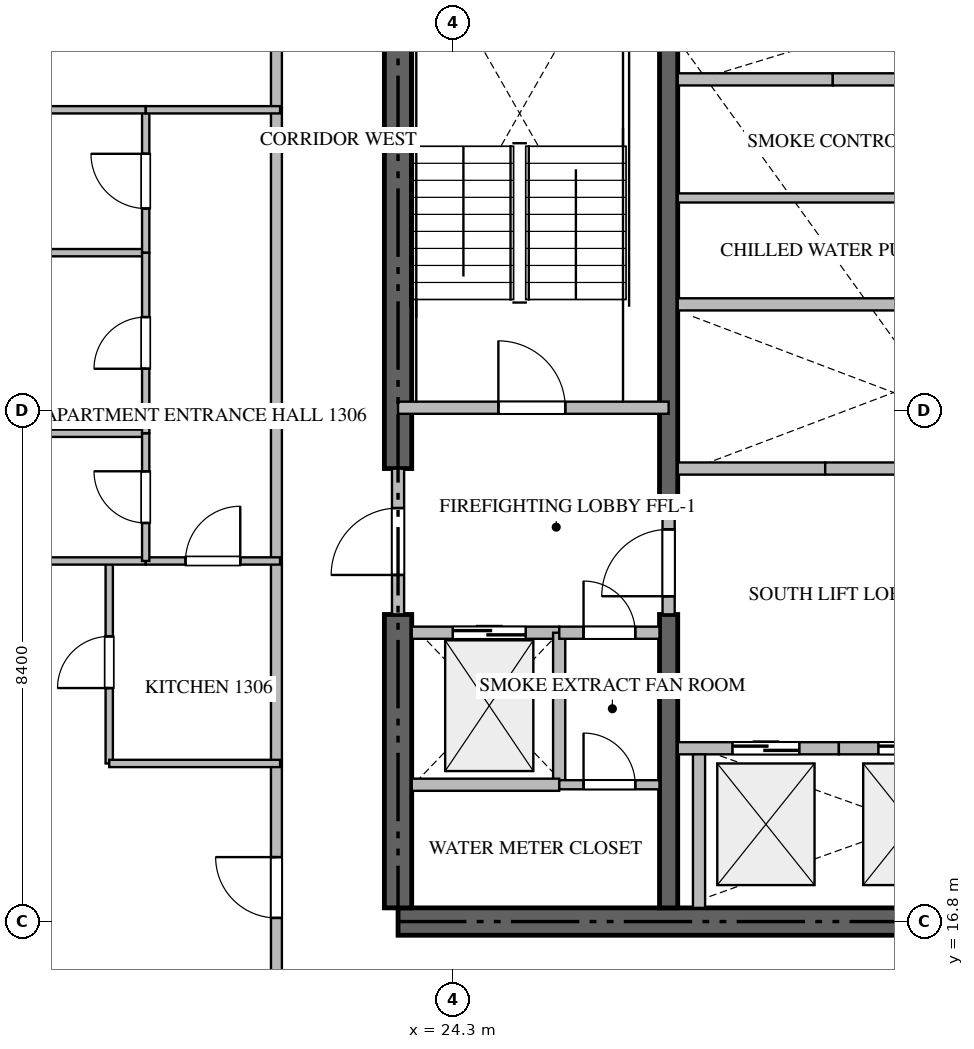
"""IFC4 building model, lengths in metres.
Left out: names, types, materials, properties, quantities, classifications, styles, units other than length and angle.
Written with IfcOpenShell. Run it as: python <this file> out.ifc"""

import sys

from ifc_helpers import new_model, si_unit, direction, frame, frame_2d, origin, place, context, subcontext, project, spatial, rectangle, extrude, source, transform, mapped, element, fill, save


model = new_model("IFC4")
c1 = context("Model", 3, precision=1e-05, world=origin(), true_north=direction((0.0, 1.0)))
c2 = subcontext(c1, "Body", "Model", "MODEL_VIEW")
j1 = project(units=[si_unit("LENGTHUNIT", "METRE"), si_unit("PLANEANGLEUNIT", "RADIAN")], contexts=[c1])
p1 = place(None, origin())
s1 = spatial("IfcSite", under=j1, at=p1, CompositionType="ELEMENT")
p2 = place(p1, origin())
s2 = spatial("IfcBuilding", under=s1, at=p2, CompositionType="ELEMENT")
p3 = place(p2, frame((0.0, 0.0, 56.7)))
s3 = spatial("IfcBuildingStorey", under=s2, at=p3, CompositionType="ELEMENT", Elevation=56.7)
p4 = place(p3, frame((23.4, 16.8, -0.26), z_axis=(0.0, 0.0, 1.0), x_axis=(1.0, 0.0, 0.0)))
e1 = element("IfcWall", 1, at=p4, inside=s3, PredefinedType="SHEAR", context=c2, shape_type="SweptSolid", body=[
    extrude(rectangle(XDim=18.0, YDim=0.45, at=frame_2d((9.0, 0.0))), origin(), (0.0, 0.0, 1.0), 3.748),
])
p5 = place(p3, frame((23.4, 17.025, -0.26), z_axis=(0.0, 0.0, 1.0), x_axis=(0.0, 1.0, 0.0)))
e2 = element("IfcWall", 2, at=p5, inside=s3, PredefinedType="SHEAR", context=c2, shape_type="SweptSolid", body=[
    extrude(rectangle(XDim=4.825, YDim=0.45, at=frame_2d((2.413, 0.0))), origin(), (0.0, 0.0, 1.0), 3.748),
])
p6 = place(p3, frame((23.4, 24.25, -0.26), z_axis=(0.0, 0.0, 1.0), x_axis=(0.0, 1.0, 0.0)))
e3 = element("IfcWall", 3, at=p6, inside=s3, PredefinedType="SHEAR", context=c2, shape_type="SweptSolid", body=[
    extrude(rectangle(XDim=9.125, YDim=0.45, at=frame_2d((4.562, 0.0))), origin(), (0.0, 0.0, 1.0), 3.748),
])
p7 = place(p3, frame((27.85, 17.025, -0.26), z_axis=(0.0, 0.0, 1.0), x_axis=(0.0, 1.0, 0.0)))
e4 = element("IfcWall", 4, at=p7, inside=s3, PredefinedType="SHEAR", context=c2, shape_type="SweptSolid", body=[
    extrude(rectangle(XDim=4.825, YDim=0.3, at=frame_2d((2.413, 0.0))), origin(), (0.0, 0.0, 1.0), 3.748),
])
p8 = place(p3, frame((27.85, 23.55, -0.26), z_axis=(0.0, 0.0, 1.0), x_axis=(0.0, 1.0, 0.0)))
e5 = element("IfcWall", 5, at=p8, inside=s3, PredefinedType="SHEAR", context=c2, shape_type="SweptSolid", body=[
    extrude(rectangle(XDim=9.825, YDim=0.3, at=frame_2d((4.913, 0.0))), origin(), (0.0, 0.0, 1.0), 3.748),
])
p9 = place(p3, frame((23.4, 25.25, 0.0), z_axis=(0.0, 0.0, 1.0), x_axis=(1.0, 0.0, 0.0)))
e6 = element("IfcWall", 6, at=p9, inside=s3, PredefinedType="STANDARD", context=c2, shape_type="SweptSolid", body=[
    extrude(rectangle(XDim=4.45, YDim=0.2, at=frame_2d((2.225, 0.0))), origin(), (0.0, 0.0, 1.0), 3.49),
])
p10 = place(p9, frame((1.65, 0.0, 0.0)))
e7 = element("IfcOpeningElement", 7, at=p10, cuts=e6, PredefinedType="OPENING", context=c2, shape_type="SweptSolid", body=[
    extrude(rectangle(XDim=1.1, YDim=2.15, at=frame_2d((0.55, 1.075))), frame((0.0, 0.11, 0.0), z_axis=(0.0, -1.0, 0.0), x_axis=(1.0, 0.0, 0.0)), (0.0, 0.0, 1.0), 0.22),
])
p11 = place(p3, frame((23.625, 21.55, 0.0), z_axis=(0.0, 0.0, 1.0), x_axis=(1.0, 0.0, 0.0)))
e8 = element("IfcWall", 8, at=p11, inside=s3, PredefinedType="STANDARD", context=c2, shape_type="SweptSolid", body=[
    extrude(rectangle(XDim=2.425, YDim=0.2, at=frame_2d((1.212, 0.0))), origin(), (0.0, 0.0, 1.0), 3.49),
])
p12 = place(p11, frame((0.675, 0.0, 0.0)))
e9 = element("IfcOpeningElement", 9, at=p12, cuts=e8, PredefinedType="OPENING", context=c2, shape_type="SweptSolid", body=[
    extrude(rectangle(XDim=1.2, YDim=2.2, at=frame_2d((0.6, 1.1))), frame((0.0, 0.11, 0.0), z_axis=(0.0, -1.0, 0.0), x_axis=(1.0, 0.0, 0.0)), (0.0, 0.0, 1.0), 0.22),
])
p13 = place(p3, frame((28.0, 19.65, 0.0), z_axis=(0.0, 0.0, 1.0), x_axis=(1.0, 0.0, 0.0)))
e10 = element("IfcWall", 10, at=p13, inside=s3, PredefinedType="STANDARD", context=c2, shape_type="SweptSolid", body=[
    extrude(rectangle(XDim=2.65, YDim=0.2, at=frame_2d((1.325, 0.0))), origin(), (0.0, 0.0, 1.0), 3.49),
])
p14 = place(p13, frame((0.9, 0.0, 0.0)))
e11 = element("IfcOpeningElement", 11, at=p14, cuts=e10, PredefinedType="OPENING", context=c2, shape_type="SweptSolid", body=[
    extrude(rectangle(XDim=1.1, YDim=2.2, at=frame_2d((0.55, 1.1))), frame((0.0, 0.11, 0.0), z_axis=(0.0, -1.0, 0.0), x_axis=(1.0, 0.0, 0.0)), (0.0, 0.0, 1.0), 0.22),
])
p15 = place(p3, frame((28.35, 17.025, 0.0), z_axis=(0.0, 0.0, 1.0), x_axis=(0.0, 1.0, 0.0)))
e12 = element("IfcWall", 12, at=p15, inside=s3, PredefinedType="STANDARD", context=c2, shape_type="SweptSolid", body=[
    extrude(rectangle(XDim=2.525, YDim=0.2, at=frame_2d((1.263, 0.0))), origin(), (0.0, 0.0, 1.0), 3.49),
])
p16 = place(p3, frame((30.65, 19.65, 0.0), z_axis=(0.0, 0.0, 1.0), x_axis=(1.0, 0.0, 0.0)))
e13 = element("IfcWall", 13, at=p16, inside=s3, PredefinedType="STANDARD", context=c2, shape_type="SweptSolid", body=[
    extrude(rectangle(XDim=2.4, YDim=0.2, at=frame_2d((1.2, 0.0))), origin(), (0.0, 0.0, 1.0), 3.49),
])
p17 = place(p16, frame((0.65, 0.0, 0.0)))
e14 = element("IfcOpeningElement", 14, at=p17, cuts=e13, PredefinedType="OPENING", context=c2, shape_type="SweptSolid", body=[
    extrude(rectangle(XDim=1.1, YDim=2.2, at=frame_2d((0.55, 1.1))), frame((0.0, 0.11, 0.0), z_axis=(0.0, -1.0, 0.0), x_axis=(1.0, 0.0, 0.0)), (0.0, 0.0, 1.0), 0.22),
])
p18 = place(p3, frame((28.0, 24.25, 0.0), z_axis=(0.0, 0.0, 1.0), x_axis=(1.0, 0.0, 0.0)))
e15 = element("IfcWall", 15, at=p18, inside=s3, PredefinedType="STANDARD", context=c2, shape_type="SweptSolid", body=[
    extrude(rectangle(XDim=2.425, YDim=0.2, at=frame_2d((1.212, 0.0))), origin(), (0.0, 0.0, 1.0), 3.49),
])
p19 = place(p3, frame((30.425, 24.25, 0.0), z_axis=(0.0, 0.0, 1.0), x_axis=(1.0, 0.0, 0.0)))
e16 = element("IfcWall", 16, at=p19, inside=s3, PredefinedType="STANDARD", context=c2, shape_type="SweptSolid", body=[
    extrude(rectangle(XDim=2.25, YDim=0.2, at=frame_2d((1.125, 0.0))), origin(), (0.0, 0.0, 1.0), 3.49),
])
p20 = place(p3, frame((28.0, 30.65, 0.0), z_axis=(0.0, 0.0, 1.0), x_axis=(1.0, 0.0, 0.0)))
e17 = element("IfcWall", 17, at=p20, inside=s3, PredefinedType="STANDARD", context=c2, shape_type="SweptSolid", body=[
    extrude(rectangle(XDim=2.55, YDim=0.2, at=frame_2d((1.275, 0.0))), origin(), (0.0, 0.0, 1.0), 3.49),
])
p21 = place(p3, frame((30.55, 30.65, 0.0), z_axis=(0.0, 0.0, 1.0), x_axis=(1.0, 0.0, 0.0)))
e18 = element("IfcWall", 18, at=p21, inside=s3, PredefinedType="STANDARD", context=c2, shape_type="SweptSolid", body=[
    extrude(rectangle(XDim=2.3, YDim=0.2, at=frame_2d((1.15, 0.0))), origin(), (0.0, 0.0, 1.0), 3.49),
])
p22 = place(p3, frame((26.05, 19.05, 0.0), z_axis=(0.0, 0.0, 1.0), x_axis=(0.0, 1.0, 0.0)))
e19 = element("IfcWall", 19, at=p22, inside=s3, PredefinedType="STANDARD", context=c2, shape_type="SweptSolid", body=[
    extrude(rectangle(XDim=2.5, YDim=0.2, at=frame_2d((1.25, 0.0))), origin(), (0.0, 0.0, 1.0), 3.49),
])
p23 = place(p3, frame((23.625, 19.05, 0.0), z_axis=(0.0, 0.0, 1.0), x_axis=(1.0, 0.0, 0.0)))
e20 = element("IfcWall", 20, at=p23, inside=s3, PredefinedType="STANDARD", context=c2, shape_type="SweptSolid", body=[
    extrude(rectangle(XDim=2.425, YDim=0.2, at=frame_2d((1.212, 0.0))), origin(), (0.0, 0.0, 1.0), 3.49),
])
p24 = place(p3, frame((26.052, 21.55, 0.0), z_axis=(0.0, 0.0, 1.0), x_axis=(1.0, 0.0, 0.0)))
e21 = element("IfcWall", 21, at=p24, inside=s3, PredefinedType="STANDARD", context=c2, shape_type="SweptSolid", body=[
    extrude(rectangle(XDim=1.648, YDim=0.2, at=frame_2d((0.824, 0.0))), origin(), (0.0, 0.0, 1.0), 3.49),
])
p25 = place(p24, frame((0.399, 0.0, 0.0)))
e22 = element("IfcOpeningElement", 22, at=p25, cuts=e21, PredefinedType="OPENING", context=c2, shape_type="SweptSolid", body=[
    extrude(rectangle(XDim=0.85, YDim=2.1, at=frame_2d((0.425, 1.05))), frame((0.0, 0.11, 0.0), z_axis=(0.0, -1.0, 0.0), x_axis=(1.0, 0.0, 0.0)), (0.0, 0.0, 1.0), 0.22),
])
p26 = place(p3, frame((23.4, 21.852, 0.0), z_axis=(0.0, 0.0, 1.0), x_axis=(0.0, 1.0, 0.0)))
e23 = element("IfcWall", 23, at=p26, inside=s3, PredefinedType="STANDARD", context=c2, shape_type="SweptSolid", body=[
    extrude(rectangle(XDim=2.396, YDim=0.2, at=frame_2d((1.198, 0.0))), origin(), (0.0, 0.0, 1.0), 3.49),
])
p27 = place(p26, frame((0.648, 0.0, 0.0)))
e24 = element("IfcOpeningElement", 24, at=p27, cuts=e23, PredefinedType="OPENING", context=c2, shape_type="SweptSolid", body=[
    extrude(rectangle(XDim=1.1, YDim=2.15, at=frame_2d((0.55, 1.075))), frame((0.0, 0.11, 0.0), z_axis=(0.0, -1.0, 0.0), x_axis=(1.0, 0.0, 0.0)), (0.0, 0.0, 1.0), 0.22),
])
p28 = place(p3, frame((27.85, 21.852, 0.0), z_axis=(0.0, 0.0, 1.0), x_axis=(0.0, 1.0, 0.0)))
e25 = element("IfcWall", 25, at=p28, inside=s3, PredefinedType="STANDARD", context=c2, shape_type="SweptSolid", body=[
    extrude(rectangle(XDim=1.696, YDim=0.2, at=frame_2d((0.848, 0.0))), origin(), (0.0, 0.0, 1.0), 3.49),
])
p29 = place(p28, frame((0.298, 0.0, 0.0)))
e26 = element("IfcOpeningElement", 26, at=p29, cuts=e25, PredefinedType="OPENING", context=c2, shape_type="SweptSolid", body=[
    extrude(rectangle(XDim=1.1, YDim=2.15, at=frame_2d((0.55, 1.075))), frame((0.0, 0.11, 0.0), z_axis=(0.0, -1.0, 0.0), x_axis=(1.0, 0.0, 0.0)), (0.0, 0.0, 1.0), 0.22),
])
p30 = place(p3, frame((28.0, 26.95, 0.0), z_axis=(0.0, 0.0, 1.0), x_axis=(1.0, 0.0, 0.0)))
e27 = element("IfcWall", 27, at=p30, inside=s3, PredefinedType="STANDARD", context=c2, shape_type="SweptSolid", body=[
    extrude(rectangle(XDim=6.95, YDim=0.2, at=frame_2d((3.475, 0.0))), origin(), (0.0, 0.0, 1.0), 3.49),
])
p31 = place(p3, frame((26.052, 19.05, 0.0), z_axis=(0.0, 0.0, 1.0), x_axis=(1.0, 0.0, 0.0)))
e28 = element("IfcWall", 28, at=p31, inside=s3, PredefinedType="PARTITIONING", context=c2, shape_type="SweptSolid", body=[
    extrude(rectangle(XDim=1.648, YDim=0.15, at=frame_2d((0.824, 0.0))), origin(), (0.0, 0.0, 1.0), 3.49),
])
p32 = place(p31, frame((0.399, 0.0, 0.0)))
e29 = element("IfcOpeningElement", 29, at=p32, cuts=e28, PredefinedType="OPENING", context=c2, shape_type="SweptSolid", body=[
    extrude(rectangle(XDim=0.85, YDim=2.1, at=frame_2d((0.425, 1.05))), frame((0.0, 0.085, 0.0), z_axis=(0.0, -1.0, 0.0), x_axis=(1.0, 0.0, 0.0)), (0.0, 0.0, 1.0), 0.17),
])
p33 = place(p3, frame((28.0, 28.7, 0.0), z_axis=(0.0, 0.0, 1.0), x_axis=(1.0, 0.0, 0.0)))
e30 = element("IfcWall", 30, at=p33, inside=s3, PredefinedType="PARTITIONING", context=c2, shape_type="SweptSolid", body=[
    extrude(rectangle(XDim=6.95, YDim=0.15, at=frame_2d((3.475, 0.0))), origin(), (0.0, 0.0, 1.0), 3.49),
])
p34 = place(p3, frame((21.4, 14.9, 0.0), z_axis=(0.0, 0.0, 1.0), x_axis=(0.0, 1.0, 0.0)))
e31 = element("IfcWall", 31, at=p34, inside=s3, PredefinedType="PARTITIONING", context=c2, shape_type="SweptSolid", body=[
    extrude(rectangle(XDim=20.6, YDim=0.18, at=frame_2d((10.3, 0.0))), origin(), (0.0, 0.0, 1.0), 3.49),
])
p35 = place(p34, frame((1.96, 0.0, 0.0)))
e32 = element("IfcOpeningElement", 32, at=p35, cuts=e31, PredefinedType="OPENING", context=c2, shape_type="SweptSolid", body=[
    extrude(rectangle(XDim=1.0, YDim=2.15, at=frame_2d((0.5, 1.075))), frame((0.0, 0.1, 0.0), z_axis=(0.0, -1.0, 0.0), x_axis=(1.0, 0.0, 0.0)), (0.0, 0.0, 1.0), 0.2),
])
p36 = place(p3, frame((18.65, 19.4, 0.0), z_axis=(0.0, 0.0, 1.0), x_axis=(0.0, 1.0, 0.0)))
e33 = element("IfcWall", 33, at=p36, inside=s3, PredefinedType="PARTITIONING", context=c2, shape_type="SweptSolid", body=[
    extrude(rectangle(XDim=3.33, YDim=0.12, at=frame_2d((1.665, 0.0))), origin(), (0.0, 0.0, 1.0), 3.49),
])
p37 = place(p36, frame((1.24, 0.0, 0.0)))
e34 = element("IfcOpeningElement", 34, at=p37, cuts=e33, PredefinedType="OPENING", context=c2, shape_type="SweptSolid", body=[
    extrude(rectangle(XDim=0.85, YDim=2.1, at=frame_2d((0.425, 1.05))), frame((0.0, 0.07, 0.0), z_axis=(0.0, -1.0, 0.0), x_axis=(1.0, 0.0, 0.0)), (0.0, 0.0, 1.0), 0.14),
])
p38 = place(p3, frame((18.65, 19.4, 0.0), z_axis=(0.0, 0.0, 1.0), x_axis=(1.0, 0.0, 0.0)))
e35 = element("IfcWall", 35, at=p38, inside=s3, PredefinedType="PARTITIONING", context=c2, shape_type="SweptSolid", body=[
    extrude(rectangle(XDim=2.81, YDim=0.12, at=frame_2d((1.405, 0.0))), origin(), (0.0, 0.0, 1.0), 3.49),
])
p39 = place(p3, frame((19.25, 22.73, 0.0), z_axis=(0.0, 0.0, 1.0), x_axis=(1.0, 0.0, 0.0)))
e36 = element("IfcWall", 36, at=p39, inside=s3, PredefinedType="PARTITIONING", context=c2, shape_type="SweptSolid", body=[
    extrude(rectangle(XDim=2.21, YDim=0.12, at=frame_2d((1.105, 0.0))), origin(), (0.0, 0.0, 1.0), 3.49),
])
p40 = place(p39, frame((0.655, 0.0, 0.0)))
e37 = element("IfcOpeningElement", 37, at=p40, cuts=e36, PredefinedType="OPENING", context=c2, shape_type="SweptSolid", body=[
    extrude(rectangle(XDim=0.9, YDim=2.1, at=frame_2d((0.45, 1.05))), frame((0.0, 0.07, 0.0), z_axis=(0.0, -1.0, 0.0), x_axis=(1.0, 0.0, 0.0)), (0.0, 0.0, 1.0), 0.14),
])
p41 = place(p3, frame((12.473, 22.73, 0.0), z_axis=(0.0, 0.0, 1.0), x_axis=(1.0, 0.0, 0.0)))
e38 = element("IfcWall", 38, at=p41, inside=s3, PredefinedType="PARTITIONING", context=c2, shape_type="SweptSolid", body=[
    extrude(rectangle(XDim=6.775, YDim=0.12, at=frame_2d((3.388, 0.0))), origin(), (0.0, 0.0, 1.0), 3.49),
])
p42 = place(p3, frame((6.095, 27.8, 0.0), z_axis=(0.0, 0.0, 1.0), x_axis=(1.0, 0.0, 0.0)))
e39 = element("IfcWall", 39, at=p42, inside=s3, PredefinedType="PARTITIONING", context=c2, shape_type="SweptSolid", body=[
    extrude(rectangle(XDim=13.155, YDim=0.12, at=frame_2d((6.578, 0.0))), origin(), (0.0, 0.0, 1.0), 3.49),
])
p43 = place(p3, frame((12.471, 24.83, 0.0), z_axis=(0.0, 0.0, 1.0), x_axis=(1.0, 0.0, 0.0)))
e40 = element("IfcWall", 40, at=p43, inside=s3, PredefinedType="PARTITIONING", context=c2, shape_type="SweptSolid", body=[
    extrude(rectangle(XDim=6.779, YDim=0.12, at=frame_2d((3.39, 0.0))), origin(), (0.0, 0.0, 1.0), 3.49),
])
p44 = place(p3, frame((19.25, 22.73, 0.0), z_axis=(0.0, 0.0, 1.0), x_axis=(0.0, 1.0, 0.0)))
e41 = element("IfcWall", 41, at=p44, inside=s3, PredefinedType="PARTITIONING", context=c2, shape_type="SweptSolid", body=[
    extrude(rectangle(XDim=2.1, YDim=0.12, at=frame_2d((1.05, 0.0))), origin(), (0.0, 0.0, 1.0), 3.49),
])
p45 = place(p44, frame((0.625, 0.0, 0.0)))
e42 = element("IfcOpeningElement", 42, at=p45, cuts=e41, PredefinedType="OPENING", context=c2, shape_type="SweptSolid", body=[
    extrude(rectangle(XDim=0.85, YDim=2.1, at=frame_2d((0.425, 1.05))), frame((0.0, 0.07, 0.0), z_axis=(0.0, -1.0, 0.0), x_axis=(1.0, 0.0, 0.0)), (0.0, 0.0, 1.0), 0.14),
])
p46 = place(p3, frame((19.25, 24.832, 0.0), z_axis=(0.0, 0.0, 1.0), x_axis=(0.0, 1.0, 0.0)))
e43 = element("IfcWall", 43, at=p46, inside=s3, PredefinedType="PARTITIONING", context=c2, shape_type="SweptSolid", body=[
    extrude(rectangle(XDim=2.968, YDim=0.12, at=frame_2d((1.484, 0.0))), origin(), (0.0, 0.0, 1.0), 3.49),
])
p47 = place(p46, frame((1.059, 0.0, 0.0)))
e44 = element("IfcOpeningElement", 44, at=p47, cuts=e43, PredefinedType="OPENING", context=c2, shape_type="SweptSolid", body=[
    extrude(rectangle(XDim=0.85, YDim=2.1, at=frame_2d((0.425, 1.05))), frame((0.0, 0.07, 0.0), z_axis=(0.0, -1.0, 0.0), x_axis=(1.0, 0.0, 0.0)), (0.0, 0.0, 1.0), 0.14),
])
p48 = place(p3, frame((19.25, 27.802, 0.0), z_axis=(0.0, 0.0, 1.0), x_axis=(0.0, 1.0, 0.0)))
e45 = element("IfcWall", 45, at=p48, inside=s3, PredefinedType="PARTITIONING", context=c2, shape_type="SweptSolid", body=[
    extrude(rectangle(XDim=2.348, YDim=0.12, at=frame_2d((1.174, 0.0))), origin(), (0.0, 0.0, 1.0), 3.49),
])
p49 = place(p48, frame((0.724, 0.0, 0.0)))
e46 = element("IfcOpeningElement", 46, at=p49, cuts=e45, PredefinedType="OPENING", context=c2, shape_type="SweptSolid", body=[
    extrude(rectangle(XDim=0.9, YDim=2.1, at=frame_2d((0.45, 1.05))), frame((0.0, 0.07, 0.0), z_axis=(0.0, -1.0, 0.0), x_axis=(1.0, 0.0, 0.0)), (0.0, 0.0, 1.0), 0.14),
])
p50 = place(p3, frame((12.669, 30.15, 0.0), z_axis=(0.0, 0.0, 1.0), x_axis=(1.0, 0.0, 0.0)))
e47 = element("IfcWall", 47, at=p50, inside=s3, PredefinedType="PARTITIONING", context=c2, shape_type="SweptSolid", body=[
    extrude(rectangle(XDim=6.581, YDim=0.12, at=frame_2d((3.291, 0.0))), origin(), (0.0, 0.0, 1.0), 3.49),
])
p51 = place(p50, frame((2.865, 0.0, 0.0)))
e48 = element("IfcOpeningElement", 48, at=p51, cuts=e47, PredefinedType="OPENING", context=c2, shape_type="SweptSolid", body=[
    extrude(rectangle(XDim=0.85, YDim=2.1, at=frame_2d((0.425, 1.05))), frame((0.0, 0.07, 0.0), z_axis=(0.0, -1.0, 0.0), x_axis=(1.0, 0.0, 0.0)), (0.0, 0.0, 1.0), 0.14),
])
p52 = place(p3, frame((19.252, 30.15, 0.0), z_axis=(0.0, 0.0, 1.0), x_axis=(1.0, 0.0, 0.0)))
e49 = element("IfcWall", 49, at=p52, inside=s3, PredefinedType="PARTITIONING", context=c2, shape_type="SweptSolid", body=[
    extrude(rectangle(XDim=2.208, YDim=0.12, at=frame_2d((1.104, 0.0))), origin(), (0.0, 0.0, 1.0), 3.49),
])
m1 = source(origin(), c2, "Body", "SweptSolid", [
    extrude(rectangle(XDim=1.1, YDim=2.15, at=frame_2d((0.55, 1.075))), frame((0.0, 0.025, 0.0), z_axis=(0.0, -1.0, 0.0), x_axis=(1.0, 0.0, 0.0)), (0.0, 0.0, 1.0), 0.05),
])
p53 = place(p10, origin())
e50 = element("IfcDoor", 50, at=p53, inside=s3, OperationType="SINGLE_SWING_LEFT", PredefinedType="DOOR", context=c2, shape_type="MappedRepresentation", body=[
    mapped(m1, transform((0.0, 0.0, 0.0), scale=1.0)),
])
fill(e7, e50)
m2 = source(origin(), c2, "Body", "SweptSolid", [
    extrude(rectangle(XDim=1.2, YDim=2.2, at=frame_2d((0.6, 1.1))), frame((0.0, 0.025, 0.0), z_axis=(0.0, -1.0, 0.0), x_axis=(1.0, 0.0, 0.0)), (0.0, 0.0, 1.0), 0.05),
])
p54 = place(p12, origin())
e51 = element("IfcDoor", 51, at=p54, inside=s3, OperationType="DOUBLE_DOOR_SLIDING", PredefinedType="DOOR", context=c2, shape_type="MappedRepresentation", body=[
    mapped(m2, transform((0.0, 0.0, 0.0), scale=1.0)),
])
fill(e9, e51)
m3 = source(origin(), c2, "Body", "SweptSolid", [
    extrude(rectangle(XDim=1.1, YDim=2.2, at=frame_2d((0.55, 1.1))), frame((0.0, 0.025, 0.0), z_axis=(0.0, -1.0, 0.0), x_axis=(1.0, 0.0, 0.0)), (0.0, 0.0, 1.0), 0.05),
])
p55 = place(p14, origin())
e52 = element("IfcDoor", 52, at=p55, inside=s3, OperationType="DOUBLE_DOOR_SLIDING", PredefinedType="DOOR", context=c2, shape_type="MappedRepresentation", body=[
    mapped(m3, transform((0.0, 0.0, 0.0), scale=1.0)),
])
fill(e11, e52)
p56 = place(p17, origin())
e53 = element("IfcDoor", 53, at=p56, inside=s3, OperationType="DOUBLE_DOOR_SLIDING", PredefinedType="DOOR", context=c2, shape_type="MappedRepresentation", body=[
    mapped(m3, transform((0.0, 0.0, 0.0), scale=1.0)),
])
fill(e14, e53)
m4 = source(origin(), c2, "Body", "SweptSolid", [
    extrude(rectangle(XDim=0.85, YDim=2.1, at=frame_2d((0.425, 1.05))), frame((0.0, 0.025, 0.0), z_axis=(0.0, -1.0, 0.0), x_axis=(1.0, 0.0, 0.0)), (0.0, 0.0, 1.0), 0.05),
])
p57 = place(p25, origin())
e54 = element("IfcDoor", 54, at=p57, inside=s3, OperationType="SINGLE_SWING_LEFT", PredefinedType="DOOR", context=c2, shape_type="MappedRepresentation", body=[
    mapped(m4, transform((0.0, 0.0, 0.0), scale=1.0)),
])
fill(e22, e54)
p58 = place(p27, origin())
e55 = element("IfcDoor", 55, at=p58, inside=s3, OperationType="SINGLE_SWING_LEFT", PredefinedType="DOOR", context=c2, shape_type="MappedRepresentation", body=[
    mapped(m1, transform((0.0, 0.0, 0.0), scale=1.0)),
])
fill(e24, e55)
p59 = place(p29, origin())
e56 = element("IfcDoor", 56, at=p59, inside=s3, OperationType="SINGLE_SWING_LEFT", PredefinedType="DOOR", context=c2, shape_type="MappedRepresentation", body=[
    mapped(m1, transform((0.0, 0.0, 0.0), scale=1.0)),
])
fill(e26, e56)
p60 = place(p32, origin())
e57 = element("IfcDoor", 57, at=p60, inside=s3, OperationType="SINGLE_SWING_LEFT", PredefinedType="DOOR", context=c2, shape_type="MappedRepresentation", body=[
    mapped(m4, transform((0.0, 0.0, 0.0), scale=1.0)),
])
fill(e29, e57)
m5 = source(origin(), c2, "Body", "SweptSolid", [
    extrude(rectangle(XDim=1.0, YDim=2.15, at=frame_2d((0.5, 1.075))), frame((0.0, 0.025, 0.0), z_axis=(0.0, -1.0, 0.0), x_axis=(1.0, 0.0, 0.0)), (0.0, 0.0, 1.0), 0.05),
])
p61 = place(p35, origin())
e58 = element("IfcDoor", 58, at=p61, inside=s3, OperationType="SINGLE_SWING_RIGHT", PredefinedType="DOOR", context=c2, shape_type="MappedRepresentation", body=[
    mapped(m5, transform((0.0, 0.0, 0.0), scale=1.0)),
])
fill(e32, e58)
p62 = place(p37, origin())
e59 = element("IfcDoor", 59, at=p62, inside=s3, OperationType="SINGLE_SWING_LEFT", PredefinedType="DOOR", context=c2, shape_type="MappedRepresentation", body=[
    mapped(m4, transform((0.0, 0.0, 0.0), scale=1.0)),
])
fill(e34, e59)
m6 = source(origin(), c2, "Body", "SweptSolid", [
    extrude(rectangle(XDim=0.9, YDim=2.1, at=frame_2d((0.45, 1.05))), frame((0.0, 0.025, 0.0), z_axis=(0.0, -1.0, 0.0), x_axis=(1.0, 0.0, 0.0)), (0.0, 0.0, 1.0), 0.05),
])
p63 = place(p40, origin())
e60 = element("IfcDoor", 60, at=p63, inside=s3, OperationType="SINGLE_SWING_RIGHT", PredefinedType="DOOR", context=c2, shape_type="MappedRepresentation", body=[
    mapped(m6, transform((0.0, 0.0, 0.0), scale=1.0)),
])
fill(e37, e60)
p64 = place(p45, origin())
e61 = element("IfcDoor", 61, at=p64, inside=s3, OperationType="SINGLE_SWING_RIGHT", PredefinedType="DOOR", context=c2, shape_type="MappedRepresentation", body=[
    mapped(m4, transform((0.0, 0.0, 0.0), scale=1.0)),
])
fill(e42, e61)
p65 = place(p47, origin())
e62 = element("IfcDoor", 62, at=p65, inside=s3, OperationType="SINGLE_SWING_LEFT", PredefinedType="DOOR", context=c2, shape_type="MappedRepresentation", body=[
    mapped(m4, transform((0.0, 0.0, 0.0), scale=1.0)),
])
fill(e44, e62)
p66 = place(p49, origin())
e63 = element("IfcDoor", 63, at=p66, inside=s3, OperationType="SINGLE_SWING_RIGHT", PredefinedType="DOOR", context=c2, shape_type="MappedRepresentation", body=[
    mapped(m6, transform((0.0, 0.0, 0.0), scale=1.0)),
])
fill(e46, e63)
save(model, sys.argv[1])
